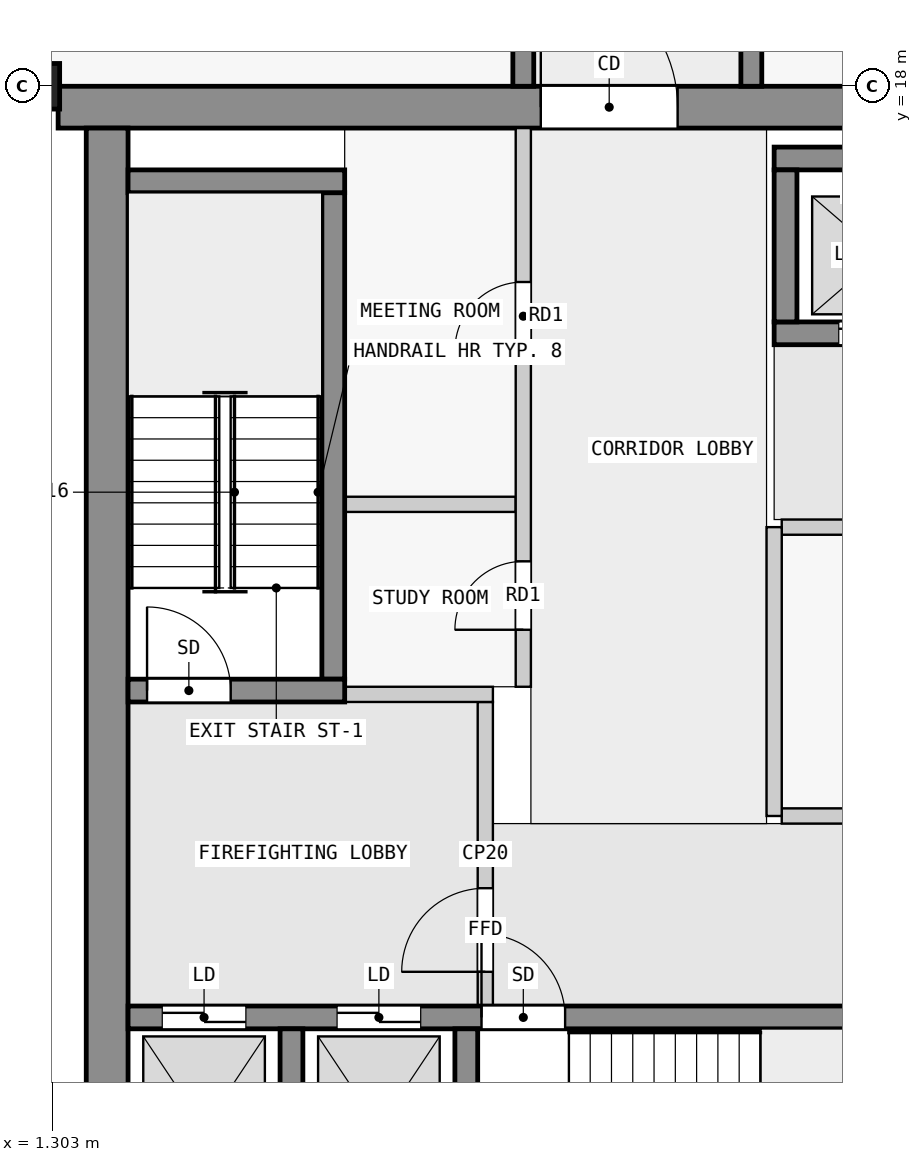
"""IFC4 building model, lengths in metres.
Left out: names, types, materials, properties, quantities, classifications, styles, units other than length and angle.
Written with IfcOpenShell. Run it as: python <this file> out.ifc"""

import sys

from ifc_helpers import new_model, si_unit, direction, frame, frame_2d, origin, origin_2d, place, context, subcontext, project, spatial, rectangle, extrude, element, fill, save


model = new_model("IFC4")
c1 = context("Model", 3, precision=1e-05, world=origin(), true_north=direction((0.0, 1.0)))
c2 = subcontext(c1, "Body", "Model", "MODEL_VIEW")
j1 = project(units=[si_unit("LENGTHUNIT", "METRE"), si_unit("PLANEANGLEUNIT", "RADIAN")], contexts=[c1])
p1 = place(None, origin())
s1 = spatial("IfcSite", under=j1, at=p1, CompositionType="ELEMENT")
p2 = place(p1, origin())
s2 = spatial("IfcBuilding", under=s1, at=p2, CompositionType="ELEMENT")
p3 = place(p2, frame((0.0, 0.0, 211.9)))
s3 = spatial("IfcBuildingStorey", under=s2, at=p3, CompositionType="ELEMENT", Elevation=211.9)
p4 = place(p3, frame((0.7, 18.0, 0.0), z_axis=(0.0, 0.0, 1.0), x_axis=(0.0, 1.0, 0.0)))
e1 = element("IfcColumn", 1, at=p4, inside=s3, PredefinedType="COLUMN", context=c2, shape_type="SweptSolid", body=[
    extrude(rectangle(XDim=0.6, YDim=1.4, at=origin_2d()), origin(), (0.0, 0.0, 1.0), 3.5),
])
p5 = place(p3, frame((1.38, 17.725, 0.0), z_axis=(0.0, 0.0, 1.0), x_axis=(1.0, 0.0, 0.0)))
e2 = element("IfcWall", 2, at=p5, inside=s3, PredefinedType="SHEAR", context=c2, shape_type="SweptSolid", body=[
    extrude(rectangle(XDim=21.12, YDim=0.55, at=frame_2d((10.56, 0.0))), origin(), (0.0, 0.0, 1.0), 3.25),
])
p6 = place(p5, frame((6.35, 0.0, 0.0)))
e3 = element("IfcOpeningElement", 3, at=p6, cuts=e2, PredefinedType="OPENING", context=c2, shape_type="SweptSolid", body=[
    extrude(rectangle(XDim=1.8, YDim=2.1, at=frame_2d((0.9, 1.05))), frame((0.0, 0.285, 0.0), z_axis=(0.0, -1.0, 0.0), x_axis=(1.0, 0.0, 0.0)), (0.0, 0.0, 1.0), 0.57),
])
p7 = place(p3, frame((2.025, 2.5, 0.0), z_axis=(0.0, 0.0, 1.0), x_axis=(0.0, 1.0, 0.0)))
e4 = element("IfcWall", 4, at=p7, inside=s3, PredefinedType="SHEAR", context=c2, shape_type="SweptSolid", body=[
    extrude(rectangle(XDim=14.95, YDim=0.55, at=frame_2d((7.475, 0.0))), origin(), (0.0, 0.0, 1.0), 3.25),
])
for number, where, z_axis, x_axis in (
    (5, (4.45, 2.8, 0.0), (0.0, 0.0, 1.0), (0.0, 1.0, 0.0)),
    (6, (6.75, 2.8, 0.0), (0.0, 0.0, 1.0), (0.0, 1.0, 0.0)),
):
    element("IfcWall", number, at=place(p3, frame(where, z_axis=z_axis, x_axis=x_axis)), inside=s3, PredefinedType="SHEAR", context=c2, shape_type="SweptSolid", body=[
        extrude(rectangle(XDim=2.8, YDim=0.3, at=frame_2d((1.4, 0.0))), origin(), (0.0, 0.0, 1.0), 3.25),
    ])
p8 = place(p3, frame((2.3, 5.75, 0.0), z_axis=(0.0, 0.0, 1.0), x_axis=(1.0, 0.0, 0.0)))
e7 = element("IfcWall", 7, at=p8, inside=s3, PredefinedType="SHEAR", context=c2, shape_type="SweptSolid", body=[
    extrude(rectangle(XDim=18.8, YDim=0.3, at=frame_2d((9.4, 0.0))), origin(), (0.0, 0.0, 1.0), 3.25),
])
p9 = place(p8, frame((4.65, 0.0, 0.0)))
e8 = element("IfcOpeningElement", 8, at=p9, cuts=e7, PredefinedType="OPENING", context=c2, shape_type="SweptSolid", body=[
    extrude(rectangle(XDim=1.1, YDim=2.1, at=frame_2d((0.55, 1.05))), frame((0.0, 0.16, 0.0), z_axis=(0.0, -1.0, 0.0), x_axis=(1.0, 0.0, 0.0)), (0.0, 0.0, 1.0), 0.32),
])
p10 = place(p8, frame((0.45, 0.0, 0.0)))
e9 = element("IfcOpeningElement", 9, at=p10, cuts=e7, PredefinedType="OPENING", context=c2, shape_type="SweptSolid", body=[
    extrude(rectangle(XDim=1.1, YDim=2.1, at=frame_2d((0.55, 1.05))), frame((0.0, 0.16, 0.0), z_axis=(0.0, -1.0, 0.0), x_axis=(1.0, 0.0, 0.0)), (0.0, 0.0, 1.0), 0.32),
])
p11 = place(p8, frame((2.75, 0.0, 0.0)))
e10 = element("IfcOpeningElement", 10, at=p11, cuts=e7, PredefinedType="OPENING", context=c2, shape_type="SweptSolid", body=[
    extrude(rectangle(XDim=1.1, YDim=2.1, at=frame_2d((0.55, 1.05))), frame((0.0, 0.16, 0.0), z_axis=(0.0, -1.0, 0.0), x_axis=(1.0, 0.0, 0.0)), (0.0, 0.0, 1.0), 0.32),
])
p12 = place(p8, frame((13.2, 0.0, 0.0)))
e11 = element("IfcOpeningElement", 11, at=p12, cuts=e7, PredefinedType="OPENING", context=c2, shape_type="SweptSolid", body=[
    extrude(rectangle(XDim=0.9, YDim=2.1, at=frame_2d((0.45, 1.05))), frame((0.0, 0.16, 0.0), z_axis=(0.0, -1.0, 0.0), x_axis=(1.0, 0.0, 0.0)), (0.0, 0.0, 1.0), 0.32),
])
p13 = place(p8, frame((16.95, 0.0, 0.0)))
e12 = element("IfcOpeningElement", 12, at=p13, cuts=e7, PredefinedType="OPENING", context=c2, shape_type="SweptSolid", body=[
    extrude(rectangle(XDim=0.9, YDim=2.1, at=frame_2d((0.45, 1.05))), frame((0.0, 0.16, 0.0), z_axis=(0.0, -1.0, 0.0), x_axis=(1.0, 0.0, 0.0)), (0.0, 0.0, 1.0), 0.32),
])
p14 = place(p3, frame((2.3, 10.05, 0.0), z_axis=(0.0, 0.0, 1.0), x_axis=(1.0, 0.0, 0.0)))
e13 = element("IfcWall", 13, at=p14, inside=s3, PredefinedType="SHEAR", context=c2, shape_type="SweptSolid", body=[
    extrude(rectangle(XDim=2.85, YDim=0.3, at=frame_2d((1.425, 0.0))), origin(), (0.0, 0.0, 1.0), 3.25),
])
p15 = place(p14, frame((0.25, 0.0, 0.0)))
e14 = element("IfcOpeningElement", 14, at=p15, cuts=e13, PredefinedType="OPENING", context=c2, shape_type="SweptSolid", body=[
    extrude(rectangle(XDim=1.1, YDim=2.1, at=frame_2d((0.55, 1.05))), frame((0.0, 0.16, 0.0), z_axis=(0.0, -1.0, 0.0), x_axis=(1.0, 0.0, 0.0)), (0.0, 0.0, 1.0), 0.32),
])
p16 = place(p3, frame((5.0, 10.2, 0.0), z_axis=(0.0, 0.0, 1.0), x_axis=(0.0, 1.0, 0.0)))
e15 = element("IfcWall", 15, at=p16, inside=s3, PredefinedType="SHEAR", context=c2, shape_type="SweptSolid", body=[
    extrude(rectangle(XDim=6.4, YDim=0.3, at=frame_2d((3.2, 0.0))), origin(), (0.0, 0.0, 1.0), 3.25),
])
p17 = place(p3, frame((2.3, 16.75, 0.0), z_axis=(0.0, 0.0, 1.0), x_axis=(1.0, 0.0, 0.0)))
e16 = element("IfcWall", 16, at=p17, inside=s3, PredefinedType="SHEAR", context=c2, shape_type="SweptSolid", body=[
    extrude(rectangle(XDim=2.85, YDim=0.3, at=frame_2d((1.425, 0.0))), origin(), (0.0, 0.0, 1.0), 3.25),
])
p18 = place(p3, frame((10.8, 17.05, 0.0), z_axis=(0.0, 0.0, 1.0), x_axis=(1.0, 0.0, 0.0)))
e17 = element("IfcWall", 17, at=p18, inside=s3, PredefinedType="SHEAR", context=c2, shape_type="SweptSolid", body=[
    extrude(rectangle(XDim=7.8, YDim=0.3, at=frame_2d((3.9, 0.0))), origin(), (0.0, 0.0, 1.0), 3.25),
])
p19 = place(p3, frame((10.8, 14.75, 0.0), z_axis=(0.0, 0.0, 1.0), x_axis=(1.0, 0.0, 0.0)))
e18 = element("IfcWall", 18, at=p19, inside=s3, PredefinedType="SHEAR", context=c2, shape_type="SweptSolid", body=[
    extrude(rectangle(XDim=7.8, YDim=0.3, at=frame_2d((3.9, 0.0))), origin(), (0.0, 0.0, 1.0), 3.25),
])
p20 = place(p19, frame((0.85, 0.0, 0.0)))
e19 = element("IfcOpeningElement", 19, at=p20, cuts=e18, PredefinedType="OPENING", context=c2, shape_type="SweptSolid", body=[
    extrude(rectangle(XDim=1.1, YDim=2.1, at=frame_2d((0.55, 1.05))), frame((0.0, 0.16, 0.0), z_axis=(0.0, -1.0, 0.0), x_axis=(1.0, 0.0, 0.0)), (0.0, 0.0, 1.0), 0.32),
])
p21 = place(p19, frame((3.35, 0.0, 0.0)))
e20 = element("IfcOpeningElement", 20, at=p21, cuts=e18, PredefinedType="OPENING", context=c2, shape_type="SweptSolid", body=[
    extrude(rectangle(XDim=1.1, YDim=2.1, at=frame_2d((0.55, 1.05))), frame((0.0, 0.16, 0.0), z_axis=(0.0, -1.0, 0.0), x_axis=(1.0, 0.0, 0.0)), (0.0, 0.0, 1.0), 0.32),
])
p22 = place(p19, frame((5.85, 0.0, 0.0)))
e21 = element("IfcOpeningElement", 21, at=p22, cuts=e18, PredefinedType="OPENING", context=c2, shape_type="SweptSolid", body=[
    extrude(rectangle(XDim=1.1, YDim=2.1, at=frame_2d((0.55, 1.05))), frame((0.0, 0.16, 0.0), z_axis=(0.0, -1.0, 0.0), x_axis=(1.0, 0.0, 0.0)), (0.0, 0.0, 1.0), 0.32),
])
p23 = place(p3, frame((10.95, 14.9, 0.0), z_axis=(0.0, 0.0, 1.0), x_axis=(0.0, 1.0, 0.0)))
e22 = element("IfcWall", 22, at=p23, inside=s3, PredefinedType="SHEAR", context=c2, shape_type="SweptSolid", body=[
    extrude(rectangle(XDim=2.0, YDim=0.3, at=frame_2d((1.0, 0.0))), origin(), (0.0, 0.0, 1.0), 3.25),
])
p24 = place(p3, frame((7.5, 18.0, 0.0), z_axis=(0.0, 0.0, 1.0), x_axis=(0.0, 1.0, 0.0)))
e23 = element("IfcWall", 23, at=p24, inside=s3, PredefinedType="SHEAR", context=c2, shape_type="SweptSolid", body=[
    extrude(rectangle(XDim=27.0, YDim=0.275, at=frame_2d((13.5, 0.0))), origin(), (0.0, 0.0, 1.0), 3.25),
])
p25 = place(p24, frame((1.75, 0.0, 0.0)))
e24 = element("IfcOpeningElement", 24, at=p25, cuts=e23, PredefinedType="OPENING", context=c2, shape_type="SweptSolid", body=[
    extrude(rectangle(XDim=1.0, YDim=2.1, at=frame_2d((0.5, 1.05))), frame((0.0, 0.147, 0.0), z_axis=(0.0, -1.0, 0.0), x_axis=(1.0, 0.0, 0.0)), (0.0, 0.0, 1.0), 0.295),
])
p26 = place(p24, frame((6.25, 0.0, 0.0)))
e25 = element("IfcOpeningElement", 25, at=p26, cuts=e23, PredefinedType="OPENING", context=c2, shape_type="SweptSolid", body=[
    extrude(rectangle(XDim=1.0, YDim=2.1, at=frame_2d((0.5, 1.05))), frame((0.0, 0.147, 0.0), z_axis=(0.0, -1.0, 0.0), x_axis=(1.0, 0.0, 0.0)), (0.0, 0.0, 1.0), 0.295),
])
p27 = place(p24, frame((10.35, 0.0, 0.0)))
e26 = element("IfcOpeningElement", 26, at=p27, cuts=e23, PredefinedType="OPENING", context=c2, shape_type="SweptSolid", body=[
    extrude(rectangle(XDim=1.8, YDim=2.1, at=frame_2d((0.9, 1.05))), frame((0.0, 0.147, 0.0), z_axis=(0.0, -1.0, 0.0), x_axis=(1.0, 0.0, 0.0)), (0.0, 0.0, 1.0), 0.295),
])
p28 = place(p24, frame((15.25, 0.0, 0.0)))
e27 = element("IfcOpeningElement", 27, at=p28, cuts=e23, PredefinedType="OPENING", context=c2, shape_type="SweptSolid", body=[
    extrude(rectangle(XDim=1.0, YDim=2.1, at=frame_2d((0.5, 1.05))), frame((0.0, 0.147, 0.0), z_axis=(0.0, -1.0, 0.0), x_axis=(1.0, 0.0, 0.0)), (0.0, 0.0, 1.0), 0.295),
])
p29 = place(p24, frame((19.75, 0.0, 0.0)))
e28 = element("IfcOpeningElement", 28, at=p29, cuts=e23, PredefinedType="OPENING", context=c2, shape_type="SweptSolid", body=[
    extrude(rectangle(XDim=1.0, YDim=2.1, at=frame_2d((0.5, 1.05))), frame((0.0, 0.147, 0.0), z_axis=(0.0, -1.0, 0.0), x_axis=(1.0, 0.0, 0.0)), (0.0, 0.0, 1.0), 0.295),
])
p30 = place(p24, frame((23.25, 0.0, 0.0)))
e29 = element("IfcOpeningElement", 29, at=p30, cuts=e23, PredefinedType="OPENING", context=c2, shape_type="SweptSolid", body=[
    extrude(rectangle(XDim=0.9, YDim=2.1, at=frame_2d((0.45, 1.05))), frame((0.0, 0.147, 0.0), z_axis=(0.0, -1.0, 0.0), x_axis=(1.0, 0.0, 0.0)), (0.0, 0.0, 1.0), 0.295),
])
p31 = place(p24, frame((25.45, 0.0, 0.0)))
e30 = element("IfcOpeningElement", 30, at=p31, cuts=e23, PredefinedType="OPENING", context=c2, shape_type="SweptSolid", body=[
    extrude(rectangle(XDim=1.0, YDim=2.1, at=frame_2d((0.5, 1.05))), frame((0.0, 0.147, 0.0), z_axis=(0.0, -1.0, 0.0), x_axis=(1.0, 0.0, 0.0)), (0.0, 0.0, 1.0), 0.295),
])
p32 = place(p3, frame((10.5, 18.0, 0.0), z_axis=(0.0, 0.0, 1.0), x_axis=(0.0, 1.0, 0.0)))
e31 = element("IfcWall", 31, at=p32, inside=s3, PredefinedType="SHEAR", context=c2, shape_type="SweptSolid", body=[
    extrude(rectangle(XDim=27.0, YDim=0.275, at=frame_2d((13.5, 0.0))), origin(), (0.0, 0.0, 1.0), 3.25),
])
p33 = place(p32, frame((1.75, 0.0, 0.0)))
e32 = element("IfcOpeningElement", 32, at=p33, cuts=e31, PredefinedType="OPENING", context=c2, shape_type="SweptSolid", body=[
    extrude(rectangle(XDim=1.0, YDim=2.1, at=frame_2d((0.5, 1.05))), frame((0.0, 0.147, 0.0), z_axis=(0.0, -1.0, 0.0), x_axis=(1.0, 0.0, 0.0)), (0.0, 0.0, 1.0), 0.295),
])
p34 = place(p32, frame((6.25, 0.0, 0.0)))
e33 = element("IfcOpeningElement", 33, at=p34, cuts=e31, PredefinedType="OPENING", context=c2, shape_type="SweptSolid", body=[
    extrude(rectangle(XDim=1.0, YDim=2.1, at=frame_2d((0.5, 1.05))), frame((0.0, 0.147, 0.0), z_axis=(0.0, -1.0, 0.0), x_axis=(1.0, 0.0, 0.0)), (0.0, 0.0, 1.0), 0.295),
])
p35 = place(p32, frame((10.75, 0.0, 0.0)))
e34 = element("IfcOpeningElement", 34, at=p35, cuts=e31, PredefinedType="OPENING", context=c2, shape_type="SweptSolid", body=[
    extrude(rectangle(XDim=1.0, YDim=2.1, at=frame_2d((0.5, 1.05))), frame((0.0, 0.147, 0.0), z_axis=(0.0, -1.0, 0.0), x_axis=(1.0, 0.0, 0.0)), (0.0, 0.0, 1.0), 0.295),
])
p36 = place(p32, frame((15.25, 0.0, 0.0)))
e35 = element("IfcOpeningElement", 35, at=p36, cuts=e31, PredefinedType="OPENING", context=c2, shape_type="SweptSolid", body=[
    extrude(rectangle(XDim=1.0, YDim=2.1, at=frame_2d((0.5, 1.05))), frame((0.0, 0.147, 0.0), z_axis=(0.0, -1.0, 0.0), x_axis=(1.0, 0.0, 0.0)), (0.0, 0.0, 1.0), 0.295),
])
p37 = place(p32, frame((21.35, 0.0, 0.0)))
e36 = element("IfcOpeningElement", 36, at=p37, cuts=e31, PredefinedType="OPENING", context=c2, shape_type="SweptSolid", body=[
    extrude(rectangle(XDim=1.0, YDim=2.1, at=frame_2d((0.5, 1.05))), frame((0.0, 0.147, 0.0), z_axis=(0.0, -1.0, 0.0), x_axis=(1.0, 0.0, 0.0)), (0.0, 0.0, 1.0), 0.295),
])
p38 = place(p3, frame((7.0, 5.9, 0.0), z_axis=(0.0, 0.0, 1.0), x_axis=(0.0, 1.0, 0.0)))
e37 = element("IfcWall", 37, at=p38, inside=s3, PredefinedType="PARTITIONING", context=c2, shape_type="SweptSolid", body=[
    extrude(rectangle(XDim=4.0, YDim=0.2, at=frame_2d((2.0, 0.0))), origin(), (0.0, 0.0, 1.0), 3.25),
])
p39 = place(p38, frame((0.45, 0.0, 0.0)))
e38 = element("IfcOpeningElement", 38, at=p39, cuts=e37, PredefinedType="OPENING", context=c2, shape_type="SweptSolid", body=[
    extrude(rectangle(XDim=1.1, YDim=2.1, at=frame_2d((0.55, 1.05))), frame((0.0, 0.11, 0.0), z_axis=(0.0, -1.0, 0.0), x_axis=(1.0, 0.0, 0.0)), (0.0, 0.0, 1.0), 0.22),
])
p40 = place(p3, frame((5.15, 10.0, 0.0), z_axis=(0.0, 0.0, 1.0), x_axis=(1.0, 0.0, 0.0)))
e39 = element("IfcWall", 39, at=p40, inside=s3, PredefinedType="PARTITIONING", context=c2, shape_type="SweptSolid", body=[
    extrude(rectangle(XDim=1.95, YDim=0.2, at=frame_2d((0.975, 0.0))), origin(), (0.0, 0.0, 1.0), 3.25),
])
p41 = place(p3, frame((10.8, 8.4, 0.0), z_axis=(0.0, 0.0, 1.0), x_axis=(0.0, 1.0, 0.0)))
e40 = element("IfcWall", 40, at=p41, inside=s3, PredefinedType="PARTITIONING", context=c2, shape_type="SweptSolid", body=[
    extrude(rectangle(XDim=3.8, YDim=0.2, at=frame_2d((1.9, 0.0))), origin(), (0.0, 0.0, 1.0), 3.25),
])
p42 = place(p3, frame((10.9, 8.4, 0.0), z_axis=(0.0, 0.0, 1.0), x_axis=(1.0, 0.0, 0.0)))
e41 = element("IfcWall", 41, at=p42, inside=s3, PredefinedType="PARTITIONING", context=c2, shape_type="SweptSolid", body=[
    extrude(rectangle(XDim=8.55, YDim=0.2, at=frame_2d((4.275, 0.0))), origin(), (0.0, 0.0, 1.0), 3.25),
])
p43 = place(p3, frame((10.9, 12.2, 0.0), z_axis=(0.0, 0.0, 1.0), x_axis=(1.0, 0.0, 0.0)))
e42 = element("IfcWall", 42, at=p43, inside=s3, PredefinedType="PARTITIONING", context=c2, shape_type="SweptSolid", body=[
    extrude(rectangle(XDim=8.55, YDim=0.2, at=frame_2d((4.275, 0.0))), origin(), (0.0, 0.0, 1.0), 3.25),
])
p44 = place(p43, frame((3.825, 0.0, 0.0)))
e43 = element("IfcOpeningElement", 43, at=p44, cuts=e42, PredefinedType="OPENING", context=c2, shape_type="SweptSolid", body=[
    extrude(rectangle(XDim=0.9, YDim=2.1, at=frame_2d((0.45, 1.05))), frame((0.0, 0.11, 0.0), z_axis=(0.0, -1.0, 0.0), x_axis=(1.0, 0.0, 0.0)), (0.0, 0.0, 1.0), 0.22),
])
p45 = place(p3, frame((7.5, 10.1, 0.0), z_axis=(0.0, 0.0, 1.0), x_axis=(0.0, 1.0, 0.0)))
e44 = element("IfcWall", 44, at=p45, inside=s3, PredefinedType="PARTITIONING", context=c2, shape_type="SweptSolid", body=[
    extrude(rectangle(XDim=7.35, YDim=0.2, at=frame_2d((3.675, 0.0))), origin(), (0.0, 0.0, 1.0), 3.25),
])
p46 = place(p45, frame((0.75, 0.0, 0.0)))
e45 = element("IfcOpeningElement", 45, at=p46, cuts=e44, PredefinedType="OPENING", context=c2, shape_type="SweptSolid", body=[
    extrude(rectangle(XDim=0.9, YDim=2.1, at=frame_2d((0.45, 1.05))), frame((0.0, 0.11, 0.0), z_axis=(0.0, -1.0, 0.0), x_axis=(1.0, 0.0, 0.0)), (0.0, 0.0, 1.0), 0.22),
])
p47 = place(p45, frame((4.425, 0.0, 0.0)))
e46 = element("IfcOpeningElement", 46, at=p47, cuts=e44, PredefinedType="OPENING", context=c2, shape_type="SweptSolid", body=[
    extrude(rectangle(XDim=0.9, YDim=2.1, at=frame_2d((0.45, 1.05))), frame((0.0, 0.11, 0.0), z_axis=(0.0, -1.0, 0.0), x_axis=(1.0, 0.0, 0.0)), (0.0, 0.0, 1.0), 0.22),
])
p48 = place(p3, frame((5.15, 12.5, 0.0), z_axis=(0.0, 0.0, 1.0), x_axis=(1.0, 0.0, 0.0)))
e47 = element("IfcWall", 47, at=p48, inside=s3, PredefinedType="PARTITIONING", context=c2, shape_type="SweptSolid", body=[
    extrude(rectangle(XDim=2.25, YDim=0.2, at=frame_2d((1.125, 0.0))), origin(), (0.0, 0.0, 1.0), 3.25),
])
p49 = place(p39, origin())
e48 = element("IfcDoor", 48, at=p49, inside=s3, OperationType="SINGLE_SWING_LEFT", PredefinedType="DOOR", context=c2, shape_type="SweptSolid", body=[
    extrude(rectangle(XDim=1.1, YDim=2.1, at=frame_2d((0.55, 1.05))), frame((0.0, 0.025, 0.0), z_axis=(0.0, -1.0, 0.0), x_axis=(1.0, 0.0, 0.0)), (0.0, 0.0, 1.0), 0.05),
])
fill(e38, e48)
p50 = place(p15, origin())
e49 = element("IfcDoor", 49, at=p50, inside=s3, OperationType="SINGLE_SWING_RIGHT", PredefinedType="DOOR", context=c2, shape_type="SweptSolid", body=[
    extrude(rectangle(XDim=1.1, YDim=2.1, at=frame_2d((0.55, 1.05))), frame((0.0, 0.025, 0.0), z_axis=(0.0, -1.0, 0.0), x_axis=(1.0, 0.0, 0.0)), (0.0, 0.0, 1.0), 0.05),
])
fill(e14, e49)
p51 = place(p9, origin())
e50 = element("IfcDoor", 50, at=p51, inside=s3, OperationType="SINGLE_SWING_LEFT", PredefinedType="DOOR", context=c2, shape_type="SweptSolid", body=[
    extrude(rectangle(XDim=1.1, YDim=2.1, at=frame_2d((0.55, 1.05))), frame((0.0, 0.025, 0.0), z_axis=(0.0, -1.0, 0.0), x_axis=(1.0, 0.0, 0.0)), (0.0, 0.0, 1.0), 0.05),
])
fill(e8, e50)
p52 = place(p10, origin())
e51 = element("IfcDoor", 51, at=p52, inside=s3, OperationType="DOUBLE_DOOR_SLIDING", PredefinedType="DOOR", context=c2, shape_type="SweptSolid", body=[
    extrude(rectangle(XDim=1.1, YDim=2.1, at=frame_2d((0.55, 1.05))), frame((0.0, 0.025, 0.0), z_axis=(0.0, -1.0, 0.0), x_axis=(1.0, 0.0, 0.0)), (0.0, 0.0, 1.0), 0.05),
])
fill(e9, e51)
p53 = place(p11, origin())
e52 = element("IfcDoor", 52, at=p53, inside=s3, OperationType="DOUBLE_DOOR_SLIDING", PredefinedType="DOOR", context=c2, shape_type="SweptSolid", body=[
    extrude(rectangle(XDim=1.1, YDim=2.1, at=frame_2d((0.55, 1.05))), frame((0.0, 0.025, 0.0), z_axis=(0.0, -1.0, 0.0), x_axis=(1.0, 0.0, 0.0)), (0.0, 0.0, 1.0), 0.05),
])
fill(e10, e52)
p54 = place(p20, origin())
e53 = element("IfcDoor", 53, at=p54, inside=s3, OperationType="DOUBLE_DOOR_SLIDING", PredefinedType="DOOR", context=c2, shape_type="SweptSolid", body=[
    extrude(rectangle(XDim=1.1, YDim=2.1, at=frame_2d((0.55, 1.05))), frame((0.0, 0.025, 0.0), z_axis=(0.0, -1.0, 0.0), x_axis=(1.0, 0.0, 0.0)), (0.0, 0.0, 1.0), 0.05),
])
fill(e19, e53)
p55 = place(p6, origin())
e54 = element("IfcDoor", 54, at=p55, inside=s3, OperationType="DOUBLE_DOOR_SINGLE_SWING", PredefinedType="DOOR", context=c2, shape_type="SweptSolid", body=[
    extrude(rectangle(XDim=1.8, YDim=2.1, at=frame_2d((0.9, 1.05))), frame((0.0, 0.025, 0.0), z_axis=(0.0, -1.0, 0.0), x_axis=(1.0, 0.0, 0.0)), (0.0, 0.0, 1.0), 0.05),
])
fill(e3, e54)
p56 = place(p46, origin())
e55 = element("IfcDoor", 55, at=p56, inside=s3, OperationType="SINGLE_SWING_RIGHT", PredefinedType="DOOR", context=c2, shape_type="SweptSolid", body=[
    extrude(rectangle(XDim=0.9, YDim=2.1, at=frame_2d((0.45, 1.05))), frame((0.0, 0.025, 0.0), z_axis=(0.0, -1.0, 0.0), x_axis=(1.0, 0.0, 0.0)), (0.0, 0.0, 1.0), 0.05),
])
fill(e45, e55)
p57 = place(p47, origin())
e56 = element("IfcDoor", 56, at=p57, inside=s3, OperationType="SINGLE_SWING_RIGHT", PredefinedType="DOOR", context=c2, shape_type="SweptSolid", body=[
    extrude(rectangle(XDim=0.9, YDim=2.1, at=frame_2d((0.45, 1.05))), frame((0.0, 0.025, 0.0), z_axis=(0.0, -1.0, 0.0), x_axis=(1.0, 0.0, 0.0)), (0.0, 0.0, 1.0), 0.05),
])
fill(e46, e56)
save(model, sys.argv[1])
